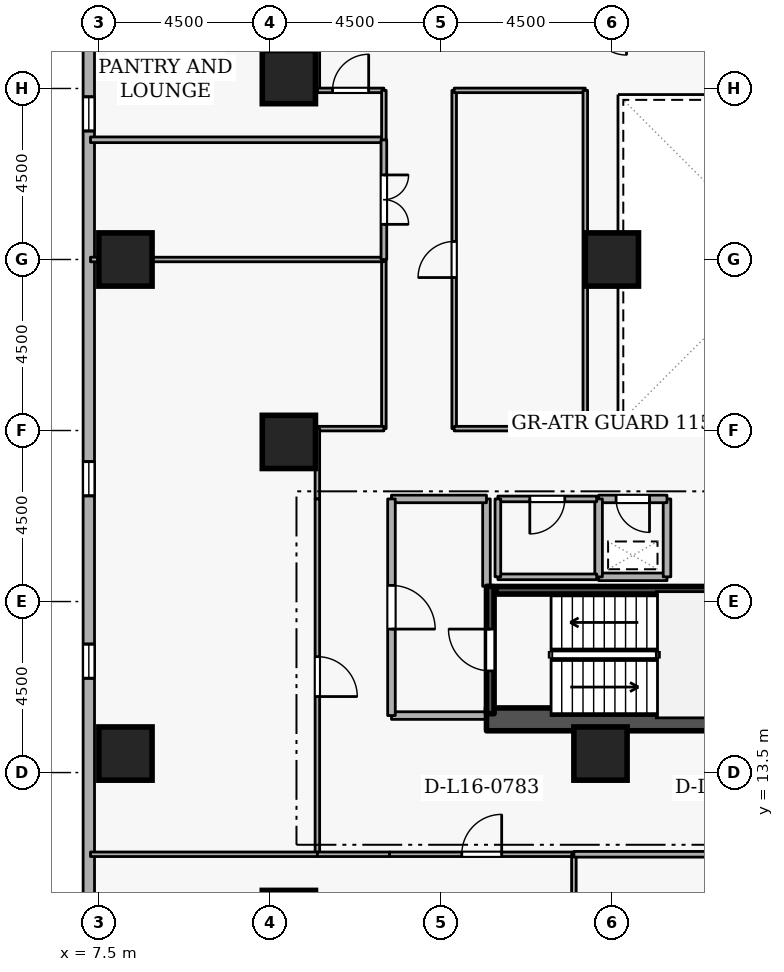
"""IFC4 building model, lengths in metres.
Left out: names, types, materials, properties, quantities, classifications, styles, units other than length and angle.
Written with IfcOpenShell. Run it as: python <this file> out.ifc"""

import sys

from ifc_helpers import new_model, si_unit, direction, frame, frame_2d, origin, origin_2d, place, context, subcontext, project, spatial, rectangle, extrude, element, fill, save


model = new_model("IFC4")
c1 = context("Model", 3, precision=1e-05, world=origin(), true_north=direction((0.0, 1.0)))
c2 = subcontext(c1, "Body", "Model", "MODEL_VIEW")
j1 = project(units=[si_unit("LENGTHUNIT", "METRE"), si_unit("PLANEANGLEUNIT", "RADIAN")], contexts=[c1])
p1 = place(None, origin())
s1 = spatial("IfcSite", under=j1, at=p1, CompositionType="ELEMENT")
p2 = place(p1, origin())
s2 = spatial("IfcBuilding", under=s1, at=p2, CompositionType="ELEMENT")
p3 = place(p2, frame((0.0, 0.0, 64.5)))
s3 = spatial("IfcBuildingStorey", under=s2, at=p3, CompositionType="ELEMENT", Elevation=64.5)
p4 = place(p3, frame((17.7, 14.9, 0.0), z_axis=(0.0, 0.0, 1.0), x_axis=(1.0, 0.0, 0.0)))
e1 = element("IfcWall", 1, at=p4, inside=s3, PredefinedType="SHEAR", context=c2, shape_type="SweptSolid", body=[
    extrude(rectangle(XDim=15.6, YDim=0.6, at=frame_2d((7.8, 0.0))), origin(), (0.0, 0.0, 1.0), 3.6),
])
for number, where, z_axis, x_axis in (
    (2, (12.5, 9.7, 0.0), (0.0, 0.0, 1.0), (1.0, 0.0, 0.0)),
    (3, (8.2, 14.0, 0.0), (0.0, 0.0, 1.0), (1.0, 0.0, 0.0)),
    (4, (8.2, 27.0, 0.0), (0.0, 0.0, 1.0), (1.0, 0.0, 0.0)),
    (5, (12.5, 22.2, 0.0), (0.0, 0.0, 1.0), (1.0, 0.0, 0.0)),
    (6, (12.5, 31.8, 0.0), (0.0, 0.0, 1.0), (1.0, 0.0, 0.0)),
    (7, (20.7, 14.0, 0.0), (0.0, 0.0, 1.0), (1.0, 0.0, 0.0)),
    (8, (21.0, 27.0, 0.0), (0.0, 0.0, 1.0), (1.0, 0.0, 0.0)),
):
    element("IfcColumn", number, at=place(p3, frame(where, z_axis=z_axis, x_axis=x_axis)), inside=s3, PredefinedType="COLUMN", context=c2, shape_type="SweptSolid", body=[
        extrude(rectangle(XDim=1.4, YDim=1.4, at=origin_2d()), origin(), (0.0, 0.0, 1.0), 3.6),
    ])
p5 = place(p3, frame((7.235, 42.681, 0.0), z_axis=(0.0, 0.0, 1.0), x_axis=(3.2959355e-05, -0.999999999457, 0.0)))
e9 = element("IfcWall", 9, at=p5, inside=s3, PredefinedType="STANDARD", context=c2, shape_type="SweptSolid", body=[
    extrude(rectangle(XDim=37.037, YDim=0.3, at=frame_2d((18.518, 0.0))), origin(), (0.0, 0.0, 1.0), 2.7),
])
p6 = place(p5, frame((6.6, 0.0, 0.72)))
e10 = element("IfcOpeningElement", 10, at=p6, cuts=e9, PredefinedType="OPENING", context=c2, shape_type="SweptSolid", body=[
    extrude(rectangle(XDim=0.9, YDim=1.75, at=frame_2d((0.45, 0.875))), frame((0.0, 0.16, 0.0), z_axis=(0.0, -1.0, 0.0), x_axis=(1.0, 0.0, 0.0)), (0.0, 0.0, 1.0), 0.32),
])
p7 = place(p5, frame((11.4, 0.0, 0.72)))
e11 = element("IfcOpeningElement", 11, at=p7, cuts=e9, PredefinedType="OPENING", context=c2, shape_type="SweptSolid", body=[
    extrude(rectangle(XDim=0.9, YDim=1.75, at=frame_2d((0.45, 0.875))), frame((0.0, 0.16, 0.0), z_axis=(0.0, -1.0, 0.0), x_axis=(1.0, 0.0, 0.0)), (0.0, 0.0, 1.0), 0.32),
])
p8 = place(p5, frame((21.0, 0.0, 0.72)))
e12 = element("IfcOpeningElement", 12, at=p8, cuts=e9, PredefinedType="OPENING", context=c2, shape_type="SweptSolid", body=[
    extrude(rectangle(XDim=0.9, YDim=1.75, at=frame_2d((0.45, 0.875))), frame((0.0, 0.16, 0.0), z_axis=(0.0, -1.0, 0.0), x_axis=(1.0, 0.0, 0.0)), (0.0, 0.0, 1.0), 0.32),
])
p9 = place(p5, frame((25.8, 0.0, 0.72)))
e13 = element("IfcOpeningElement", 13, at=p9, cuts=e9, PredefinedType="OPENING", context=c2, shape_type="SweptSolid", body=[
    extrude(rectangle(XDim=0.9, YDim=1.75, at=frame_2d((0.45, 0.875))), frame((0.0, 0.16, 0.0), z_axis=(0.0, -1.0, 0.0), x_axis=(1.0, 0.0, 0.0)), (0.0, 0.0, 1.0), 0.32),
])
p10 = place(p3, frame((17.8, 15.05, 0.0), z_axis=(0.0, 0.0, 1.0), x_axis=(0.0, 1.0, 0.0)))
e14 = element("IfcWall", 14, at=p10, inside=s3, PredefinedType="SHEAR", context=c2, shape_type="SweptSolid", body=[
    extrude(rectangle(XDim=3.35, YDim=0.2, at=frame_2d((1.675, 0.0))), origin(), (0.0, 0.0, 1.0), 3.6),
])
p11 = place(p10, frame((1.125, 0.0, 0.0)))
e15 = element("IfcOpeningElement", 15, at=p11, cuts=e14, PredefinedType="OPENING", context=c2, shape_type="SweptSolid", body=[
    extrude(rectangle(XDim=1.1, YDim=2.1, at=frame_2d((0.55, 1.05))), frame((0.0, 0.11, 0.0), z_axis=(0.0, -1.0, 0.0), x_axis=(1.0, 0.0, 0.0)), (0.0, 0.0, 1.0), 0.22),
])
p12 = place(p3, frame((25.05, 18.297, 0.0), z_axis=(0.0, 0.0, 1.0), x_axis=(-1.0, 0.0, 0.0)))
e16 = element("IfcWall", 16, at=p12, inside=s3, PredefinedType="SHEAR", context=c2, shape_type="SweptSolid", body=[
    extrude(rectangle(XDim=7.1, YDim=0.2, at=frame_2d((3.55, 0.0))), origin(), (0.0, 0.0, 1.0), 3.6),
])
p13 = place(p3, frame((15.2, 15.0, 0.0), z_axis=(0.0, 0.0, 1.0), x_axis=(1.0, 0.0, 0.0)))
e17 = element("IfcWall", 17, at=p13, inside=s3, PredefinedType="STANDARD", context=c2, shape_type="SweptSolid", body=[
    extrude(rectangle(XDim=2.5, YDim=0.2, at=frame_2d((1.25, 0.0))), origin(), (0.0, 0.0, 1.0), 3.34),
])
p14 = place(p3, frame((17.7, 18.4, 0.0), z_axis=(0.0, 0.0, 1.0), x_axis=(0.0, 1.0, 0.0)))
e18 = element("IfcWall", 18, at=p14, inside=s3, PredefinedType="STANDARD", context=c2, shape_type="SweptSolid", body=[
    extrude(rectangle(XDim=2.3, YDim=0.2, at=frame_2d((1.15, 0.0))), origin(), (0.0, 0.0, 1.0), 2.545),
])
p15 = place(p3, frame((17.7, 20.7, 0.0), z_axis=(0.0, 0.0, 1.0), x_axis=(-1.0, 0.0, 0.0)))
e19 = element("IfcWall", 19, at=p15, inside=s3, PredefinedType="STANDARD", context=c2, shape_type="SweptSolid", body=[
    extrude(rectangle(XDim=2.5, YDim=0.2, at=frame_2d((1.25, 0.0))), origin(), (0.0, 0.0, 1.0), 3.34),
])
p16 = place(p3, frame((15.2, 20.7, 0.0), z_axis=(0.0, 0.0, 1.0), x_axis=(0.0, -1.0, 0.0)))
e20 = element("IfcWall", 20, at=p16, inside=s3, PredefinedType="STANDARD", context=c2, shape_type="SweptSolid", body=[
    extrude(rectangle(XDim=5.7, YDim=0.2, at=frame_2d((2.85, 0.0))), origin(), (0.0, 0.0, 1.0), 3.34),
])
p17 = place(p16, frame((2.275, 0.0, 0.0)))
e21 = element("IfcOpeningElement", 21, at=p17, cuts=e20, PredefinedType="OPENING", context=c2, shape_type="SweptSolid", body=[
    extrude(rectangle(XDim=1.15, YDim=2.1, at=frame_2d((0.575, 1.05))), frame((0.0, 0.11, 0.0), z_axis=(0.0, -1.0, 0.0), x_axis=(1.0, 0.0, 0.0)), (0.0, 0.0, 1.0), 0.22),
])
p18 = place(p3, frame((20.65, 18.65, 0.0), z_axis=(0.0, 0.0, 1.0), x_axis=(1.0, 0.0, 0.0)))
e22 = element("IfcWall", 22, at=p18, inside=s3, PredefinedType="STANDARD", context=c2, shape_type="SweptSolid", body=[
    extrude(rectangle(XDim=1.8, YDim=0.2, at=frame_2d((0.9, 0.0))), origin(), (0.0, 0.0, 1.0), 3.34),
])
p19 = place(p3, frame((22.45, 18.65, 0.0), z_axis=(0.0, 0.0, 1.0), x_axis=(0.0, 1.0, 0.0)))
e23 = element("IfcWall", 23, at=p19, inside=s3, PredefinedType="STANDARD", context=c2, shape_type="SweptSolid", body=[
    extrude(rectangle(XDim=2.05, YDim=0.2, at=frame_2d((1.025, 0.0))), origin(), (0.0, 0.0, 1.0), 3.34),
])
p20 = place(p3, frame((22.45, 20.7, 0.0), z_axis=(0.0, 0.0, 1.0), x_axis=(-1.0, 0.0, 0.0)))
e24 = element("IfcWall", 24, at=p20, inside=s3, PredefinedType="STANDARD", context=c2, shape_type="SweptSolid", body=[
    extrude(rectangle(XDim=1.8, YDim=0.2, at=frame_2d((0.9, 0.0))), origin(), (0.0, 0.0, 1.0), 3.34),
])
p21 = place(p20, frame((0.46, 0.0, 0.0)))
e25 = element("IfcOpeningElement", 25, at=p21, cuts=e24, PredefinedType="OPENING", context=c2, shape_type="SweptSolid", body=[
    extrude(rectangle(XDim=0.88, YDim=2.04, at=frame_2d((0.44, 1.02))), frame((0.0, 0.11, 0.0), z_axis=(0.0, -1.0, 0.0), x_axis=(1.0, 0.0, 0.0)), (0.0, 0.0, 1.0), 0.22),
])
p22 = place(p3, frame((20.65, 20.7, 0.0), z_axis=(0.0, 0.0, 1.0), x_axis=(0.0, -1.0, 0.0)))
e26 = element("IfcWall", 26, at=p22, inside=s3, PredefinedType="STANDARD", context=c2, shape_type="SweptSolid", body=[
    extrude(rectangle(XDim=2.05, YDim=0.2, at=frame_2d((1.025, 0.0))), origin(), (0.0, 0.0, 1.0), 3.34),
])
p23 = place(p3, frame((18.0, 18.65, 0.0), z_axis=(0.0, 0.0, 1.0), x_axis=(1.0, 0.0, 0.0)))
e27 = element("IfcWall", 27, at=p23, inside=s3, PredefinedType="PARTITIONING", context=c2, shape_type="SweptSolid", body=[
    extrude(rectangle(XDim=2.6, YDim=0.15, at=frame_2d((1.3, 0.0))), origin(), (0.0, 0.0, 1.0), 3.34),
])
p24 = place(p3, frame((20.6, 20.7, 0.0), z_axis=(0.0, 0.0, 1.0), x_axis=(-1.0, 0.0, 0.0)))
e28 = element("IfcWall", 28, at=p24, inside=s3, PredefinedType="PARTITIONING", context=c2, shape_type="SweptSolid", body=[
    extrude(rectangle(XDim=2.6, YDim=0.15, at=frame_2d((1.3, 0.0))), origin(), (0.0, 0.0, 1.0), 3.34),
])
p25 = place(p24, frame((0.84, 0.0, 0.0)))
e29 = element("IfcOpeningElement", 29, at=p25, cuts=e28, PredefinedType="OPENING", context=c2, shape_type="SweptSolid", body=[
    extrude(rectangle(XDim=0.92, YDim=2.08, at=frame_2d((0.46, 1.04))), frame((0.0, 0.085, 0.0), z_axis=(0.0, -1.0, 0.0), x_axis=(1.0, 0.0, 0.0)), (0.0, 0.0, 1.0), 0.17),
])
p26 = place(p3, frame((18.0, 20.7, 0.0), z_axis=(0.0, 0.0, 1.0), x_axis=(0.0, -1.0, 0.0)))
e30 = element("IfcWall", 30, at=p26, inside=s3, PredefinedType="PARTITIONING", context=c2, shape_type="SweptSolid", body=[
    extrude(rectangle(XDim=2.05, YDim=0.15, at=frame_2d((1.025, 0.0))), origin(), (0.0, 0.0, 1.0), 2.545),
])
p27 = place(p3, frame((15.0, 27.0, 0.0), z_axis=(0.0, 0.0, 1.0), x_axis=(0.0, -1.0, 0.0)))
e31 = element("IfcWall", 31, at=p27, inside=s3, PredefinedType="PARTITIONING", context=c2, shape_type="SweptSolid", body=[
    extrude(rectangle(XDim=4.45, YDim=0.12, at=frame_2d((2.225, 0.0))), origin(), (0.0, 0.0, 1.0), 3.34),
])
p28 = place(p3, frame((15.0, 22.55, 0.0), z_axis=(0.0, 0.0, 1.0), x_axis=(-1.0, 0.0, 0.0)))
e32 = element("IfcWall", 32, at=p28, inside=s3, PredefinedType="PARTITIONING", context=c2, shape_type="SweptSolid", body=[
    extrude(rectangle(XDim=1.75, YDim=0.12, at=frame_2d((0.875, 0.0))), origin(), (0.0, 0.0, 1.0), 3.34),
])
p29 = place(p3, frame((13.25, 22.55, 0.0), z_axis=(0.0, 0.0, 1.0), x_axis=(0.0, -1.0, 0.0)))
e33 = element("IfcWall", 33, at=p29, inside=s3, PredefinedType="PARTITIONING", context=c2, shape_type="SweptSolid", body=[
    extrude(rectangle(XDim=1.85, YDim=0.12, at=frame_2d((0.925, 0.0))), origin(), (0.0, 0.0, 1.0), 3.34),
])
p30 = place(p3, frame((13.25, 20.7, 0.0), z_axis=(0.0, 0.0, 1.0), x_axis=(0.0, -1.0, 0.0)))
e34 = element("IfcWall", 34, at=p30, inside=s3, PredefinedType="PARTITIONING", context=c2, shape_type="SweptSolid", body=[
    extrude(rectangle(XDim=9.35, YDim=0.12, at=frame_2d((4.675, 0.0))), origin(), (0.0, 0.0, 1.0), 3.34),
])
p31 = place(p30, frame((4.15, 0.0, 0.0)))
e35 = element("IfcOpeningElement", 35, at=p31, cuts=e34, PredefinedType="OPENING", context=c2, shape_type="SweptSolid", body=[
    extrude(rectangle(XDim=1.05, YDim=2.1, at=frame_2d((0.525, 1.05))), frame((0.0, 0.07, 0.0), z_axis=(0.0, -1.0, 0.0), x_axis=(1.0, 0.0, 0.0)), (0.0, 0.0, 1.0), 0.14),
])
p32 = place(p3, frame((13.25, 11.35, 0.0), z_axis=(0.0, 0.0, 1.0), x_axis=(-1.0, 0.0, 0.0)))
e36 = element("IfcWall", 36, at=p32, inside=s3, PredefinedType="PARTITIONING", context=c2, shape_type="SweptSolid", body=[
    extrude(rectangle(XDim=5.97, YDim=0.12, at=frame_2d((2.985, 0.0))), origin(), (0.0, 0.0, 1.0), 3.34),
])
p33 = place(p3, frame((7.28, 27.0, 0.0), z_axis=(0.0, 0.0, 1.0), x_axis=(1.0, 0.0, 0.0)))
e37 = element("IfcWall", 37, at=p33, inside=s3, PredefinedType="PARTITIONING", context=c2, shape_type="SweptSolid", body=[
    extrude(rectangle(XDim=7.72, YDim=0.12, at=frame_2d((3.86, 0.0))), origin(), (0.0, 0.0, 1.0), 2.878),
])
p34 = place(p3, frame((7.28, 30.15, 0.0), z_axis=(0.0, 0.0, 1.0), x_axis=(1.0, 0.0, 0.0)))
e38 = element("IfcWall", 38, at=p34, inside=s3, PredefinedType="PARTITIONING", context=c2, shape_type="SweptSolid", body=[
    extrude(rectangle(XDim=7.72, YDim=0.15, at=frame_2d((3.86, 0.0))), origin(), (0.0, 0.0, 1.0), 3.34),
])
p35 = place(p3, frame((15.0, 30.15, 0.0), z_axis=(0.0, 0.0, 1.0), x_axis=(0.0, -1.0, 0.0)))
e39 = element("IfcWall", 39, at=p35, inside=s3, PredefinedType="PARTITIONING", context=c2, shape_type="SweptSolid", body=[
    extrude(rectangle(XDim=3.15, YDim=0.15, at=frame_2d((1.575, 0.0))), origin(), (0.0, 0.0, 1.0), 3.34),
])
p36 = place(p35, frame((0.925, 0.0, 0.0)))
e40 = element("IfcOpeningElement", 40, at=p36, cuts=e39, PredefinedType="OPENING", context=c2, shape_type="SweptSolid", body=[
    extrude(rectangle(XDim=1.3, YDim=2.12, at=frame_2d((0.65, 1.06))), frame((0.0, 0.085, 0.0), z_axis=(0.0, -1.0, 0.0), x_axis=(1.0, 0.0, 0.0)), (0.0, 0.0, 1.0), 0.17),
])
p37 = place(p3, frame((13.25, 33.3, 0.0), z_axis=(0.0, 0.0, 1.0), x_axis=(0.0, -1.0, 0.0)))
e41 = element("IfcWall", 41, at=p37, inside=s3, PredefinedType="PARTITIONING", context=c2, shape_type="SweptSolid", body=[
    extrude(rectangle(XDim=1.85, YDim=0.12, at=frame_2d((0.925, 0.0))), origin(), (0.0, 0.0, 1.0), 3.34),
])
p38 = place(p3, frame((13.25, 31.45, 0.0), z_axis=(0.0, 0.0, 1.0), x_axis=(1.0, 0.0, 0.0)))
e42 = element("IfcWall", 42, at=p38, inside=s3, PredefinedType="PARTITIONING", context=c2, shape_type="SweptSolid", body=[
    extrude(rectangle(XDim=1.75, YDim=0.12, at=frame_2d((0.875, 0.0))), origin(), (0.0, 0.0, 1.0), 3.34),
])
p39 = place(p38, frame((0.4, 0.0, 0.0)))
e43 = element("IfcOpeningElement", 43, at=p39, cuts=e42, PredefinedType="OPENING", context=c2, shape_type="SweptSolid", body=[
    extrude(rectangle(XDim=0.95, YDim=2.1, at=frame_2d((0.475, 1.05))), frame((0.0, 0.07, 0.0), z_axis=(0.0, -1.0, 0.0), x_axis=(1.0, 0.0, 0.0)), (0.0, 0.0, 1.0), 0.14),
])
p40 = place(p3, frame((15.0, 31.45, 0.0), z_axis=(0.0, 0.0, 1.0), x_axis=(0.0, -1.0, 0.0)))
e44 = element("IfcWall", 44, at=p40, inside=s3, PredefinedType="PARTITIONING", context=c2, shape_type="SweptSolid", body=[
    extrude(rectangle(XDim=1.3, YDim=0.12, at=frame_2d((0.65, 0.0))), origin(), (0.0, 0.0, 1.0), 3.34),
])
p41 = place(p3, frame((16.85, 22.55, 0.0), z_axis=(0.0, 0.0, 1.0), x_axis=(0.0, 1.0, 0.0)))
e45 = element("IfcWall", 45, at=p41, inside=s3, PredefinedType="PARTITIONING", context=c2, shape_type="SweptSolid", body=[
    extrude(rectangle(XDim=8.9, YDim=0.12, at=frame_2d((4.45, 0.0))), origin(), (0.0, 0.0, 1.0), 3.34),
])
p42 = place(p41, frame((3.975, 0.0, 0.0)))
e46 = element("IfcOpeningElement", 46, at=p42, cuts=e45, PredefinedType="OPENING", context=c2, shape_type="SweptSolid", body=[
    extrude(rectangle(XDim=0.95, YDim=2.1, at=frame_2d((0.475, 1.05))), frame((0.0, 0.07, 0.0), z_axis=(0.0, -1.0, 0.0), x_axis=(1.0, 0.0, 0.0)), (0.0, 0.0, 1.0), 0.14),
])
p43 = place(p3, frame((16.85, 31.45, 0.0), z_axis=(0.0, 0.0, 1.0), x_axis=(1.0, 0.0, 0.0)))
e47 = element("IfcWall", 47, at=p43, inside=s3, PredefinedType="PARTITIONING", context=c2, shape_type="SweptSolid", body=[
    extrude(rectangle(XDim=3.45, YDim=0.12, at=frame_2d((1.725, 0.0))), origin(), (0.0, 0.0, 1.0), 3.34),
])
p44 = place(p3, frame((20.3, 31.45, 0.0), z_axis=(0.0, 0.0, 1.0), x_axis=(0.0, -1.0, 0.0)))
e48 = element("IfcWall", 48, at=p44, inside=s3, PredefinedType="PARTITIONING", context=c2, shape_type="SweptSolid", body=[
    extrude(rectangle(XDim=8.9, YDim=0.12, at=frame_2d((4.45, 0.0))), origin(), (0.0, 0.0, 1.0), 3.34),
])
p45 = place(p3, frame((20.3, 22.55, 0.0), z_axis=(0.0, 0.0, 1.0), x_axis=(-1.0, 0.0, 0.0)))
e49 = element("IfcWall", 49, at=p45, inside=s3, PredefinedType="PARTITIONING", context=c2, shape_type="SweptSolid", body=[
    extrude(rectangle(XDim=3.45, YDim=0.12, at=frame_2d((1.725, 0.0))), origin(), (0.0, 0.0, 1.0), 3.34),
])
p46 = place(p3, frame((13.25, 11.35, 0.0), z_axis=(0.0, 0.0, 1.0), x_axis=(1.0, 0.0, 0.0)))
e50 = element("IfcWall", 50, at=p46, inside=s3, PredefinedType="PARTITIONING", context=c2, shape_type="SweptSolid", body=[
    extrude(rectangle(XDim=1.9, YDim=0.12, at=frame_2d((0.95, 0.0))), origin(), (0.0, 0.0, 1.0), 3.34),
])
p47 = place(p3, frame((15.15, 11.35, 0.0), z_axis=(0.0, 0.0, 1.0), x_axis=(1.0, 0.0, 0.0)))
e51 = element("IfcWall", 51, at=p47, inside=s3, PredefinedType="PARTITIONING", context=c2, shape_type="SweptSolid", body=[
    extrude(rectangle(XDim=4.85, YDim=0.12, at=frame_2d((2.425, 0.0))), origin(), (0.0, 0.0, 1.0), 3.34),
])
p48 = place(p47, frame((1.9, 0.0, 0.0)))
e52 = element("IfcOpeningElement", 52, at=p48, cuts=e51, PredefinedType="OPENING", context=c2, shape_type="SweptSolid", body=[
    extrude(rectangle(XDim=1.05, YDim=2.1, at=frame_2d((0.525, 1.05))), frame((0.0, 0.07, 0.0), z_axis=(0.0, -1.0, 0.0), x_axis=(1.0, 0.0, 0.0)), (0.0, 0.0, 1.0), 0.14),
])
p49 = place(p3, frame((20.0, 11.35, 0.0), z_axis=(0.0, 0.0, 1.0), x_axis=(0.0, -1.0, 0.0)))
e53 = element("IfcWall", 53, at=p49, inside=s3, PredefinedType="PARTITIONING", context=c2, shape_type="SweptSolid", body=[
    extrude(rectangle(XDim=8.57, YDim=0.12, at=frame_2d((4.285, 0.0))), origin(), (0.0, 0.0, 1.0), 3.34),
])
p50 = place(p3, frame((20.0, 11.35, 0.0), z_axis=(0.0, 0.0, 1.0), x_axis=(1.0, 0.0, 0.0)))
e54 = element("IfcWall", 54, at=p50, inside=s3, PredefinedType="PARTITIONING", context=c2, shape_type="SweptSolid", body=[
    extrude(rectangle(XDim=11.0, YDim=0.15, at=frame_2d((5.5, 0.0))), origin(), (0.0, 0.0, 1.0), 3.34),
])
p51 = place(p50, frame((3.655, 0.0, 0.0)))
e55 = element("IfcOpeningElement", 55, at=p51, cuts=e54, PredefinedType="OPENING", context=c2, shape_type="SweptSolid", body=[
    extrude(rectangle(XDim=1.05, YDim=2.1, at=frame_2d((0.525, 1.05))), frame((0.0, 0.085, 0.0), z_axis=(0.0, -1.0, 0.0), x_axis=(1.0, 0.0, 0.0)), (0.0, 0.0, 1.0), 0.17),
])
p52 = place(p7, origin())
e56 = element("IfcWindow", 56, at=p52, inside=s3, PartitioningType="SINGLE_PANEL", PredefinedType="WINDOW", context=c2, shape_type="SweptSolid", body=[
    extrude(rectangle(XDim=0.9, YDim=1.75, at=frame_2d((0.45, 0.875))), frame((0.0, 0.03, 0.0), z_axis=(0.0, -1.0, 0.0), x_axis=(1.0, 0.0, 0.0)), (0.0, 0.0, 1.0), 0.06),
])
fill(e11, e56)
p53 = place(p8, origin())
e57 = element("IfcWindow", 57, at=p53, inside=s3, PartitioningType="SINGLE_PANEL", PredefinedType="WINDOW", context=c2, shape_type="SweptSolid", body=[
    extrude(rectangle(XDim=0.9, YDim=1.75, at=frame_2d((0.45, 0.875))), frame((0.0, 0.03, 0.0), z_axis=(0.0, -1.0, 0.0), x_axis=(1.0, 0.0, 0.0)), (0.0, 0.0, 1.0), 0.06),
])
fill(e12, e57)
p54 = place(p9, origin())
e58 = element("IfcWindow", 58, at=p54, inside=s3, PartitioningType="SINGLE_PANEL", PredefinedType="WINDOW", context=c2, shape_type="SweptSolid", body=[
    extrude(rectangle(XDim=0.9, YDim=1.75, at=frame_2d((0.45, 0.875))), frame((0.0, 0.03, 0.0), z_axis=(0.0, -1.0, 0.0), x_axis=(1.0, 0.0, 0.0)), (0.0, 0.0, 1.0), 0.06),
])
fill(e13, e58)
p55 = place(p11, origin())
e59 = element("IfcDoor", 59, at=p55, inside=s3, OperationType="SINGLE_SWING_RIGHT", PredefinedType="DOOR", context=c2, shape_type="SweptSolid", body=[
    extrude(rectangle(XDim=1.1, YDim=2.1, at=frame_2d((0.55, 1.05))), frame((0.0, 0.025, 0.0), z_axis=(0.0, -1.0, 0.0), x_axis=(1.0, 0.0, 0.0)), (0.0, 0.0, 1.0), 0.05),
])
fill(e15, e59)
p56 = place(p17, origin())
e60 = element("IfcDoor", 60, at=p56, inside=s3, OperationType="SINGLE_SWING_RIGHT", PredefinedType="DOOR", context=c2, shape_type="SweptSolid", body=[
    extrude(rectangle(XDim=1.15, YDim=2.1, at=frame_2d((0.575, 1.05))), frame((0.0, 0.025, 0.0), z_axis=(0.0, -1.0, 0.0), x_axis=(1.0, 0.0, 0.0)), (0.0, 0.0, 1.0), 0.05),
])
fill(e21, e60)
p57 = place(p21, origin())
e61 = element("IfcDoor", 61, at=p57, inside=s3, OperationType="SINGLE_SWING_LEFT", PredefinedType="DOOR", context=c2, shape_type="SweptSolid", body=[
    extrude(rectangle(XDim=0.88, YDim=2.04, at=frame_2d((0.44, 1.02))), frame((0.0, 0.025, 0.0), z_axis=(0.0, -1.0, 0.0), x_axis=(1.0, 0.0, 0.0)), (0.0, 0.0, 1.0), 0.05),
])
fill(e25, e61)
p58 = place(p25, origin())
e62 = element("IfcDoor", 62, at=p58, inside=s3, OperationType="SINGLE_SWING_RIGHT", PredefinedType="DOOR", context=c2, shape_type="SweptSolid", body=[
    extrude(rectangle(XDim=0.92, YDim=2.08, at=frame_2d((0.46, 1.04))), frame((0.0, 0.025, 0.0), z_axis=(0.0, -1.0, 0.0), x_axis=(1.0, 0.0, 0.0)), (0.0, 0.0, 1.0), 0.05),
])
fill(e29, e62)
p59 = place(p31, origin())
e63 = element("IfcDoor", 63, at=p59, inside=s3, OperationType="SINGLE_SWING_RIGHT", PredefinedType="DOOR", context=c2, shape_type="SweptSolid", body=[
    extrude(rectangle(XDim=1.05, YDim=2.1, at=frame_2d((0.525, 1.05))), frame((0.0, 0.025, 0.0), z_axis=(0.0, -1.0, 0.0), x_axis=(1.0, 0.0, 0.0)), (0.0, 0.0, 1.0), 0.05),
])
fill(e35, e63)
p60 = place(p36, origin())
e64 = element("IfcDoor", 64, at=p60, inside=s3, OperationType="DOUBLE_DOOR_SINGLE_SWING", PredefinedType="DOOR", context=c2, shape_type="SweptSolid", body=[
    extrude(rectangle(XDim=1.3, YDim=2.12, at=frame_2d((0.65, 1.06))), frame((0.0, 0.025, 0.0), z_axis=(0.0, -1.0, 0.0), x_axis=(1.0, 0.0, 0.0)), (0.0, 0.0, 1.0), 0.05),
])
fill(e40, e64)
p61 = place(p39, origin())
e65 = element("IfcDoor", 65, at=p61, inside=s3, OperationType="SINGLE_SWING_RIGHT", PredefinedType="DOOR", context=c2, shape_type="SweptSolid", body=[
    extrude(rectangle(XDim=0.95, YDim=2.1, at=frame_2d((0.475, 1.05))), frame((0.0, 0.025, 0.0), z_axis=(0.0, -1.0, 0.0), x_axis=(1.0, 0.0, 0.0)), (0.0, 0.0, 1.0), 0.05),
])
fill(e43, e65)
p62 = place(p42, origin())
e66 = element("IfcDoor", 66, at=p62, inside=s3, OperationType="SINGLE_SWING_LEFT", PredefinedType="DOOR", context=c2, shape_type="SweptSolid", body=[
    extrude(rectangle(XDim=0.95, YDim=2.1, at=frame_2d((0.475, 1.05))), frame((0.0, 0.025, 0.0), z_axis=(0.0, -1.0, 0.0), x_axis=(1.0, 0.0, 0.0)), (0.0, 0.0, 1.0), 0.05),
])
fill(e46, e66)
p63 = place(p48, origin())
e67 = element("IfcDoor", 67, at=p63, inside=s3, OperationType="SINGLE_SWING_RIGHT", PredefinedType="DOOR", context=c2, shape_type="SweptSolid", body=[
    extrude(rectangle(XDim=1.05, YDim=2.1, at=frame_2d((0.525, 1.05))), frame((0.0, 0.025, 0.0), z_axis=(0.0, -1.0, 0.0), x_axis=(1.0, 0.0, 0.0)), (0.0, 0.0, 1.0), 0.05),
])
fill(e52, e67)
save(model, sys.argv[1])
